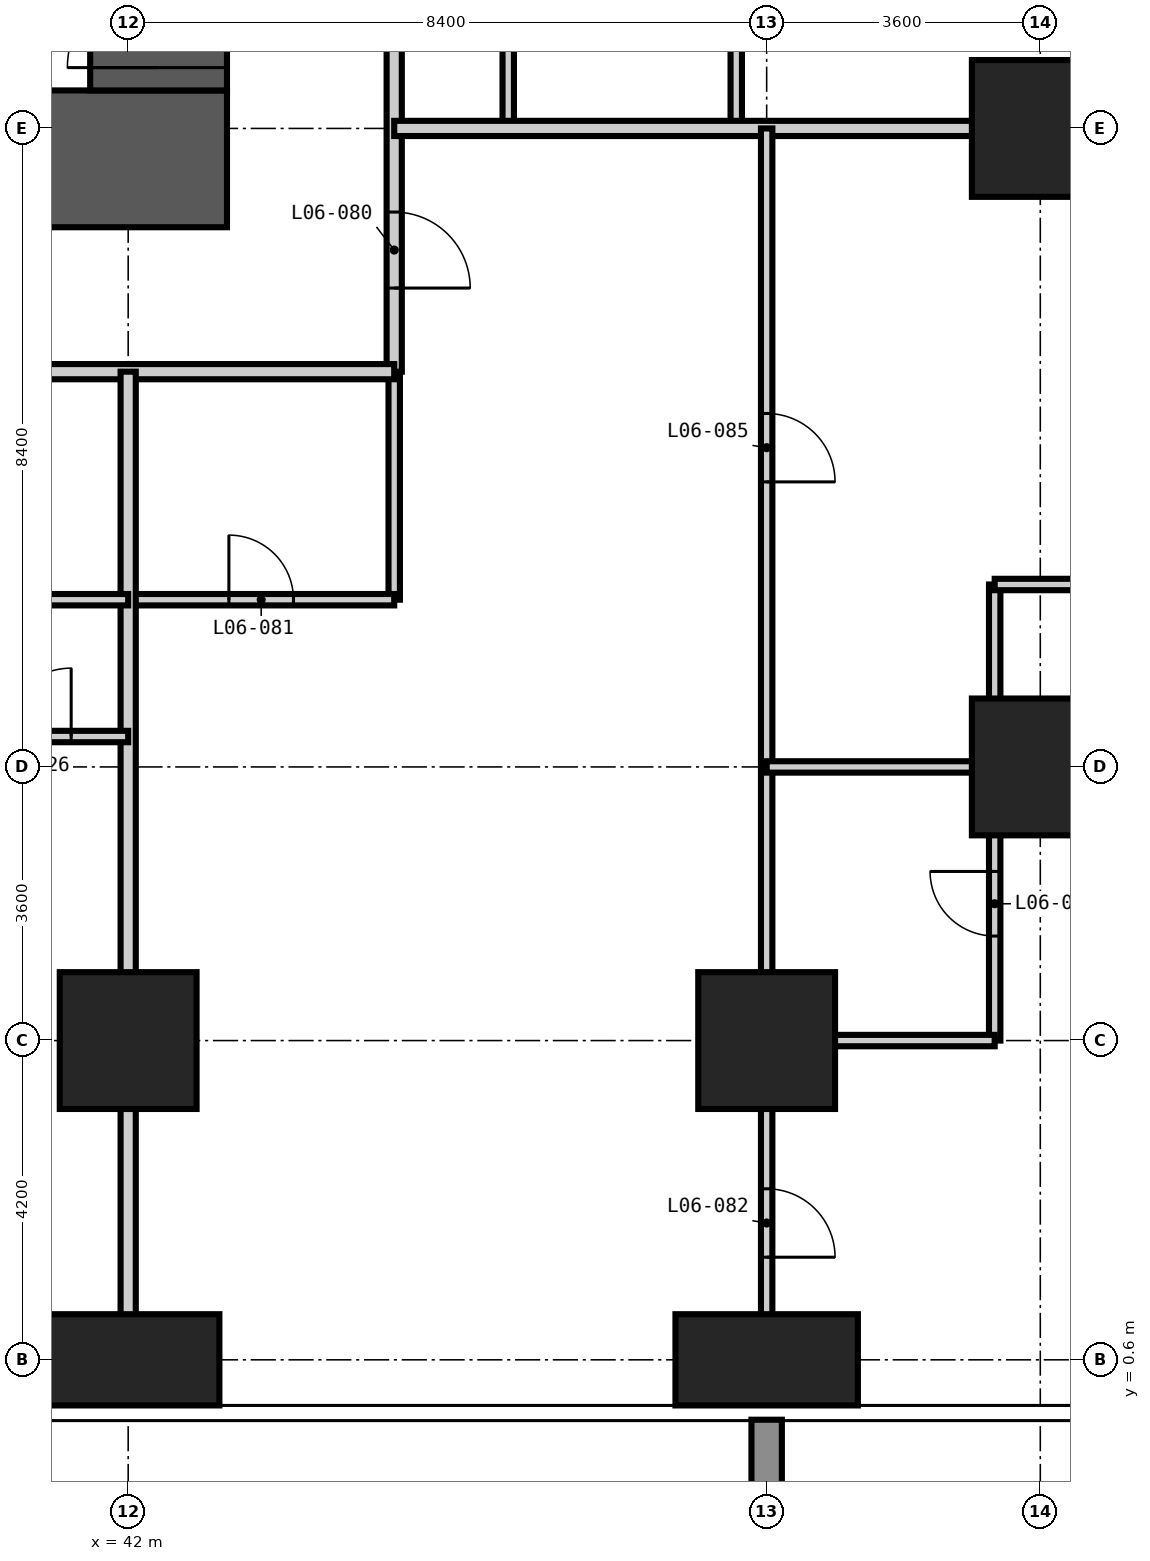
"""IFC4 building model, lengths in metres.
Left out: names, types, materials, properties, quantities, classifications, styles, units other than length and angle.
Written with IfcOpenShell. Run it as: python <this file> out.ifc"""

import sys

from ifc_helpers import new_model, si_unit, direction, frame, frame_2d, origin, origin_2d, place, context, subcontext, project, spatial, rectangle, extrude, element, fill, save


model = new_model("IFC4")
c1 = context("Model", 3, precision=1e-05, world=origin(), true_north=direction((0.0, 1.0)))
c2 = subcontext(c1, "Body", "Model", "MODEL_VIEW")
j1 = project(units=[si_unit("LENGTHUNIT", "METRE"), si_unit("PLANEANGLEUNIT", "RADIAN")], contexts=[c1])
p1 = place(None, origin())
s1 = spatial("IfcSite", under=j1, at=p1, CompositionType="ELEMENT")
p2 = place(p1, origin())
s2 = spatial("IfcBuilding", under=s1, at=p2, CompositionType="ELEMENT")
p3 = place(p2, frame((0.0, 0.0, 30.6)))
s3 = spatial("IfcBuildingStorey", under=s2, at=p3, CompositionType="ELEMENT", Elevation=30.6)
p4 = place(p3, frame((42.0, 0.6, -0.35), z_axis=(0.0, 0.0, 1.0), x_axis=(1.0, 0.0, 0.0)))
e1 = element("IfcColumn", 1, at=p4, inside=s3, PredefinedType="COLUMN", context=c2, shape_type="SweptSolid", body=[
    extrude(rectangle(XDim=2.4, YDim=1.2, at=origin_2d()), origin(), (0.0, 0.0, 1.0), 3.6),
])
p5 = place(p3, frame((42.0, 4.8, -0.35), z_axis=(0.0, 0.0, 1.0), x_axis=(1.0, 0.0, 0.0)))
e2 = element("IfcColumn", 2, at=p5, inside=s3, PredefinedType="COLUMN", context=c2, shape_type="SweptSolid", body=[
    extrude(rectangle(XDim=1.8, YDim=1.8, at=origin_2d()), origin(), (0.0, 0.0, 1.0), 3.6),
])
p6 = place(p3, frame((50.4, 0.6, -0.35), z_axis=(0.0, 0.0, 1.0), x_axis=(1.0, 0.0, 0.0)))
e3 = element("IfcColumn", 3, at=p6, inside=s3, PredefinedType="COLUMN", context=c2, shape_type="SweptSolid", body=[
    extrude(rectangle(XDim=2.4, YDim=1.2, at=origin_2d()), origin(), (0.0, 0.0, 1.0), 3.6),
])
for number, where, z_axis, x_axis in (
    (4, (50.4, 4.8, -0.35), (0.0, 0.0, 1.0), (1.0, 0.0, 0.0)),
    (5, (54.0, 8.4, -0.35), (0.0, 0.0, 1.0), (1.0, 0.0, 0.0)),
    (6, (54.0, 16.8, -0.35), (0.0, 0.0, 1.0), (1.0, 0.0, 0.0)),
):
    element("IfcColumn", number, at=place(p3, frame(where, z_axis=z_axis, x_axis=x_axis)), inside=s3, PredefinedType="COLUMN", context=c2, shape_type="SweptSolid", body=[
        extrude(rectangle(XDim=1.8, YDim=1.8, at=origin_2d()), origin(), (0.0, 0.0, 1.0), 3.6),
    ])
p7 = place(p3, frame((15.5, 16.4, -0.35), z_axis=(0.0, 0.0, 1.0), x_axis=(1.0, 0.0, 0.0)))
e7 = element("IfcWall", 7, at=p7, inside=s3, PredefinedType="SHEAR", context=c2, shape_type="SweptSolid", body=[
    extrude(rectangle(XDim=27.8, YDim=1.8, at=frame_2d((13.9, 0.0))), origin(), (0.0, 0.0, 1.0), 3.6),
])
p8 = place(p7, frame((13.4, 0.0, 0.35)))
e8 = element("IfcOpeningElement", 8, at=p8, cuts=e7, PredefinedType="OPENING", context=c2, shape_type="SweptSolid", body=[
    extrude(rectangle(XDim=1.0, YDim=2.1, at=frame_2d((0.5, 1.05))), frame((0.0, 0.91, 0.0), z_axis=(0.0, -1.0, 0.0), x_axis=(1.0, 0.0, 0.0)), (0.0, 0.0, 1.0), 1.82),
])
p9 = place(p7, frame((19.7, 0.0, 0.35)))
e9 = element("IfcOpeningElement", 9, at=p9, cuts=e7, PredefinedType="OPENING", context=c2, shape_type="SweptSolid", body=[
    extrude(rectangle(XDim=1.0, YDim=2.1, at=frame_2d((0.5, 1.05))), frame((0.0, 0.91, 0.0), z_axis=(0.0, -1.0, 0.0), x_axis=(1.0, 0.0, 0.0)), (0.0, 0.0, 1.0), 1.82),
])
p10 = place(p3, frame((42.4, 17.3, -0.35), z_axis=(0.0, 0.0, 1.0), x_axis=(0.0, 1.0, 0.0)))
e10 = element("IfcWall", 10, at=p10, inside=s3, PredefinedType="SHEAR", context=c2, shape_type="SweptSolid", body=[
    extrude(rectangle(XDim=24.2, YDim=1.8, at=frame_2d((12.1, 0.0))), origin(), (0.0, 0.0, 1.0), 3.6),
])
p11 = place(p10, frame((0.3, 0.0, 0.35)))
e11 = element("IfcOpeningElement", 11, at=p11, cuts=e10, PredefinedType="OPENING", context=c2, shape_type="SweptSolid", body=[
    extrude(rectangle(XDim=1.2, YDim=2.2, at=frame_2d((0.6, 1.1))), frame((0.0, 0.91, 0.0), z_axis=(0.0, -1.0, 0.0), x_axis=(1.0, 0.0, 0.0)), (0.0, 0.0, 1.0), 1.82),
])
p12 = place(p10, frame((11.6, 0.0, 0.35)))
e12 = element("IfcOpeningElement", 12, at=p12, cuts=e10, PredefinedType="OPENING", context=c2, shape_type="SweptSolid", body=[
    extrude(rectangle(XDim=1.0, YDim=2.1, at=frame_2d((0.5, 1.05))), frame((0.0, 0.91, 0.0), z_axis=(0.0, -1.0, 0.0), x_axis=(1.0, 0.0, 0.0)), (0.0, 0.0, 1.0), 1.82),
])
p13 = place(p10, frame((20.0, 0.0, 0.35)))
e13 = element("IfcOpeningElement", 13, at=p13, cuts=e10, PredefinedType="OPENING", context=c2, shape_type="SweptSolid", body=[
    extrude(rectangle(XDim=1.0, YDim=2.1, at=frame_2d((0.5, 1.05))), frame((0.0, 0.91, 0.0), z_axis=(0.0, -1.0, 0.0), x_axis=(1.0, 0.0, 0.0)), (0.0, 0.0, 1.0), 1.82),
])
p14 = place(p3, frame((45.5, 10.6, 0.0), z_axis=(0.0, 0.0, 1.0), x_axis=(0.0, 1.0, 0.0)))
e14 = element("IfcWall", 14, at=p14, inside=s3, PredefinedType="PARTITIONING", context=c2, shape_type="SweptSolid", body=[
    extrude(rectangle(XDim=3.0, YDim=0.15, at=frame_2d((1.5, 0.0))), origin(), (0.0, 0.0, 1.0), 3.25),
])
for number, where, z_axis, x_axis in (
    (15, (47.0, 16.8, 0.0), (0.0, 0.0, 1.0), (0.0, 1.0, 0.0)),
    (16, (50.0, 16.8, 0.0), (0.0, 0.0, 1.0), (0.0, 1.0, 0.0)),
):
    element("IfcWall", number, at=place(p3, frame(where, z_axis=z_axis, x_axis=x_axis)), inside=s3, PredefinedType="PARTITIONING", context=c2, shape_type="SweptSolid", body=[
        extrude(rectangle(XDim=2.7, YDim=0.15, at=frame_2d((1.35, 0.0))), origin(), (0.0, 0.0, 1.0), 3.25),
    ])
p15 = place(p3, frame((53.4, 4.8, 0.0), z_axis=(0.0, 0.0, 1.0), x_axis=(0.0, 1.0, 0.0)))
e17 = element("IfcWall", 17, at=p15, inside=s3, PredefinedType="PARTITIONING", context=c2, shape_type="SweptSolid", body=[
    extrude(rectangle(XDim=3.6, YDim=0.15, at=frame_2d((1.8, 0.0))), origin(), (0.0, 0.0, 1.0), 3.25),
])
p16 = place(p15, frame((1.375, 0.0, 0.0)))
e18 = element("IfcOpeningElement", 18, at=p16, cuts=e17, PredefinedType="OPENING", context=c2, shape_type="SweptSolid", body=[
    extrude(rectangle(XDim=0.85, YDim=2.1, at=frame_2d((0.425, 1.05))), frame((0.0, 0.085, 0.0), z_axis=(0.0, -1.0, 0.0), x_axis=(1.0, 0.0, 0.0)), (0.0, 0.0, 1.0), 0.17),
])
p17 = place(p3, frame((50.4, 4.8, 0.0), z_axis=(0.0, 0.0, 1.0), x_axis=(1.0, 0.0, 0.0)))
e19 = element("IfcWall", 19, at=p17, inside=s3, PredefinedType="PARTITIONING", context=c2, shape_type="SweptSolid", body=[
    extrude(rectangle(XDim=3.0, YDim=0.15, at=frame_2d((1.5, 0.0))), origin(), (0.0, 0.0, 1.0), 3.25),
])
p18 = place(p3, frame((42.0, 10.6, 0.0), z_axis=(0.0, 0.0, 1.0), x_axis=(1.0, 0.0, 0.0)))
e20 = element("IfcWall", 20, at=p18, inside=s3, PredefinedType="PARTITIONING", context=c2, shape_type="SweptSolid", body=[
    extrude(rectangle(XDim=3.5, YDim=0.15, at=frame_2d((1.75, 0.0))), origin(), (0.0, 0.0, 1.0), 3.25),
])
p19 = place(p18, frame((1.325, 0.0, 0.0)))
e21 = element("IfcOpeningElement", 21, at=p19, cuts=e20, PredefinedType="OPENING", context=c2, shape_type="SweptSolid", body=[
    extrude(rectangle(XDim=0.85, YDim=2.1, at=frame_2d((0.425, 1.05))), frame((0.0, 0.085, 0.0), z_axis=(0.0, -1.0, 0.0), x_axis=(1.0, 0.0, 0.0)), (0.0, 0.0, 1.0), 0.17),
])
p20 = place(p3, frame((45.5, 45.8, 0.0), z_axis=(0.0, 0.0, 1.0), x_axis=(0.0, -1.0, 0.0)))
e22 = element("IfcWall", 22, at=p20, inside=s3, PredefinedType="PARTITIONING", context=c2, shape_type="SweptSolid", body=[
    extrude(rectangle(XDim=32.2, YDim=0.2, at=frame_2d((16.1, 0.0))), origin(), (0.0, 0.0, 1.0), 3.25),
])
p21 = place(p20, frame((26.4, 0.0, 0.0)))
e23 = element("IfcOpeningElement", 23, at=p21, cuts=e22, PredefinedType="OPENING", context=c2, shape_type="SweptSolid", body=[
    extrude(rectangle(XDim=1.0, YDim=2.2, at=frame_2d((0.5, 1.1))), frame((0.0, 0.11, 0.0), z_axis=(0.0, -1.0, 0.0), x_axis=(1.0, 0.0, 0.0)), (0.0, 0.0, 1.0), 0.22),
])
p22 = place(p20, frame((22.2, 0.0, 0.0)))
e24 = element("IfcOpeningElement", 24, at=p22, cuts=e22, PredefinedType="OPENING", context=c2, shape_type="SweptSolid", body=[
    extrude(rectangle(XDim=1.0, YDim=2.2, at=frame_2d((0.5, 1.1))), frame((0.0, 0.11, 0.0), z_axis=(0.0, -1.0, 0.0), x_axis=(1.0, 0.0, 0.0)), (0.0, 0.0, 1.0), 0.22),
])
p23 = place(p20, frame((16.8, 0.0, 0.0)))
e25 = element("IfcOpeningElement", 25, at=p23, cuts=e22, PredefinedType="OPENING", context=c2, shape_type="SweptSolid", body=[
    extrude(rectangle(XDim=1.0, YDim=2.2, at=frame_2d((0.5, 1.1))), frame((0.0, 0.11, 0.0), z_axis=(0.0, -1.0, 0.0), x_axis=(1.0, 0.0, 0.0)), (0.0, 0.0, 1.0), 0.22),
])
p24 = place(p20, frame((15.0, 0.0, 0.0)))
e26 = element("IfcOpeningElement", 26, at=p24, cuts=e22, PredefinedType="OPENING", context=c2, shape_type="SweptSolid", body=[
    extrude(rectangle(XDim=1.0, YDim=2.2, at=frame_2d((0.5, 1.1))), frame((0.0, 0.11, 0.0), z_axis=(0.0, -1.0, 0.0), x_axis=(1.0, 0.0, 0.0)), (0.0, 0.0, 1.0), 0.22),
])
p25 = place(p20, frame((8.4, 0.0, 0.0)))
e27 = element("IfcOpeningElement", 27, at=p25, cuts=e22, PredefinedType="OPENING", context=c2, shape_type="SweptSolid", body=[
    extrude(rectangle(XDim=1.0, YDim=2.2, at=frame_2d((0.5, 1.1))), frame((0.0, 0.11, 0.0), z_axis=(0.0, -1.0, 0.0), x_axis=(1.0, 0.0, 0.0)), (0.0, 0.0, 1.0), 0.22),
])
p26 = place(p20, frame((6.6, 0.0, 0.0)))
e28 = element("IfcOpeningElement", 28, at=p26, cuts=e22, PredefinedType="OPENING", context=c2, shape_type="SweptSolid", body=[
    extrude(rectangle(XDim=1.0, YDim=2.2, at=frame_2d((0.5, 1.1))), frame((0.0, 0.11, 0.0), z_axis=(0.0, -1.0, 0.0), x_axis=(1.0, 0.0, 0.0)), (0.0, 0.0, 1.0), 0.22),
])
p27 = place(p20, frame((30.1, 0.0, 0.0)))
e29 = element("IfcOpeningElement", 29, at=p27, cuts=e22, PredefinedType="OPENING", context=c2, shape_type="SweptSolid", body=[
    extrude(rectangle(XDim=1.0, YDim=2.2, at=frame_2d((0.5, 1.1))), frame((0.0, 0.11, 0.0), z_axis=(0.0, -1.0, 0.0), x_axis=(1.0, 0.0, 0.0)), (0.0, 0.0, 1.0), 0.22),
])
p28 = place(p20, frame((1.4, 0.0, 0.0)))
e30 = element("IfcOpeningElement", 30, at=p28, cuts=e22, PredefinedType="OPENING", context=c2, shape_type="SweptSolid", body=[
    extrude(rectangle(XDim=1.0, YDim=2.2, at=frame_2d((0.5, 1.1))), frame((0.0, 0.11, 0.0), z_axis=(0.0, -1.0, 0.0), x_axis=(1.0, 0.0, 0.0)), (0.0, 0.0, 1.0), 0.22),
])
p29 = place(p3, frame((45.5, 13.6, 0.0), z_axis=(0.0, 0.0, 1.0), x_axis=(-1.0, 0.0, 0.0)))
e31 = element("IfcWall", 31, at=p29, inside=s3, PredefinedType="PARTITIONING", context=c2, shape_type="SweptSolid", body=[
    extrude(rectangle(XDim=31.9, YDim=0.2, at=frame_2d((15.95, 0.0))), origin(), (0.0, 0.0, 1.0), 3.25),
])
p30 = place(p29, frame((24.9, 0.0, 0.0)))
e32 = element("IfcOpeningElement", 32, at=p30, cuts=e31, PredefinedType="OPENING", context=c2, shape_type="SweptSolid", body=[
    extrude(rectangle(XDim=1.0, YDim=2.2, at=frame_2d((0.5, 1.1))), frame((0.0, 0.11, 0.0), z_axis=(0.0, -1.0, 0.0), x_axis=(1.0, 0.0, 0.0)), (0.0, 0.0, 1.0), 0.22),
])
p31 = place(p29, frame((23.1, 0.0, 0.0)))
e33 = element("IfcOpeningElement", 33, at=p31, cuts=e31, PredefinedType="OPENING", context=c2, shape_type="SweptSolid", body=[
    extrude(rectangle(XDim=1.0, YDim=2.2, at=frame_2d((0.5, 1.1))), frame((0.0, 0.11, 0.0), z_axis=(0.0, -1.0, 0.0), x_axis=(1.0, 0.0, 0.0)), (0.0, 0.0, 1.0), 0.22),
])
p32 = place(p29, frame((16.5, 0.0, 0.0)))
e34 = element("IfcOpeningElement", 34, at=p32, cuts=e31, PredefinedType="OPENING", context=c2, shape_type="SweptSolid", body=[
    extrude(rectangle(XDim=1.0, YDim=2.2, at=frame_2d((0.5, 1.1))), frame((0.0, 0.11, 0.0), z_axis=(0.0, -1.0, 0.0), x_axis=(1.0, 0.0, 0.0)), (0.0, 0.0, 1.0), 0.22),
])
p33 = place(p29, frame((14.7, 0.0, 0.0)))
e35 = element("IfcOpeningElement", 35, at=p33, cuts=e31, PredefinedType="OPENING", context=c2, shape_type="SweptSolid", body=[
    extrude(rectangle(XDim=1.0, YDim=2.2, at=frame_2d((0.5, 1.1))), frame((0.0, 0.11, 0.0), z_axis=(0.0, -1.0, 0.0), x_axis=(1.0, 0.0, 0.0)), (0.0, 0.0, 1.0), 0.22),
])
p34 = place(p29, frame((8.1, 0.0, 0.0)))
e36 = element("IfcOpeningElement", 36, at=p34, cuts=e31, PredefinedType="OPENING", context=c2, shape_type="SweptSolid", body=[
    extrude(rectangle(XDim=1.0, YDim=2.2, at=frame_2d((0.5, 1.1))), frame((0.0, 0.11, 0.0), z_axis=(0.0, -1.0, 0.0), x_axis=(1.0, 0.0, 0.0)), (0.0, 0.0, 1.0), 0.22),
])
p35 = place(p29, frame((6.3, 0.0, 0.0)))
e37 = element("IfcOpeningElement", 37, at=p35, cuts=e31, PredefinedType="OPENING", context=c2, shape_type="SweptSolid", body=[
    extrude(rectangle(XDim=1.0, YDim=2.2, at=frame_2d((0.5, 1.1))), frame((0.0, 0.11, 0.0), z_axis=(0.0, -1.0, 0.0), x_axis=(1.0, 0.0, 0.0)), (0.0, 0.0, 1.0), 0.22),
])
p36 = place(p3, frame((42.0, -0.008, 0.0), z_axis=(0.0, 0.0, 1.0), x_axis=(0.0, 1.0, 0.0)))
e38 = element("IfcWall", 38, at=p36, inside=s3, PredefinedType="PARTITIONING", context=c2, shape_type="SweptSolid", body=[
    extrude(rectangle(XDim=13.608, YDim=0.2, at=frame_2d((6.804, 0.0))), origin(), (0.0, 0.0, 1.0), 3.25),
])
p37 = place(p3, frame((45.5, 16.8, 0.0), z_axis=(0.0, 0.0, 1.0), x_axis=(1.0, 0.0, 0.0)))
e39 = element("IfcWall", 39, at=p37, inside=s3, PredefinedType="PARTITIONING", context=c2, shape_type="SweptSolid", body=[
    extrude(rectangle(XDim=13.308, YDim=0.2, at=frame_2d((6.654, 0.0))), origin(), (0.0, 0.0, 1.0), 3.25),
])
p38 = place(p3, frame((50.4, -0.008, 0.0), z_axis=(0.0, 0.0, 1.0), x_axis=(0.0, 1.0, 0.0)))
e40 = element("IfcWall", 40, at=p38, inside=s3, PredefinedType="PARTITIONING", context=c2, shape_type="SweptSolid", body=[
    extrude(rectangle(XDim=16.808, YDim=0.15, at=frame_2d((8.404, 0.0))), origin(), (0.0, 0.0, 1.0), 3.25),
])
p39 = place(p38, frame((1.958, 0.0, 0.0)))
e41 = element("IfcOpeningElement", 41, at=p39, cuts=e40, PredefinedType="OPENING", context=c2, shape_type="SweptSolid", body=[
    extrude(rectangle(XDim=0.9, YDim=2.1, at=frame_2d((0.45, 1.05))), frame((0.0, 0.085, 0.0), z_axis=(0.0, -1.0, 0.0), x_axis=(1.0, 0.0, 0.0)), (0.0, 0.0, 1.0), 0.17),
])
p40 = place(p38, frame((12.158, 0.0, 0.0)))
e42 = element("IfcOpeningElement", 42, at=p40, cuts=e40, PredefinedType="OPENING", context=c2, shape_type="SweptSolid", body=[
    extrude(rectangle(XDim=0.9, YDim=2.1, at=frame_2d((0.45, 1.05))), frame((0.0, 0.085, 0.0), z_axis=(0.0, -1.0, 0.0), x_axis=(1.0, 0.0, 0.0)), (0.0, 0.0, 1.0), 0.17),
])
p41 = place(p3, frame((53.4, 8.4, 0.0), z_axis=(0.0, 0.0, 1.0), x_axis=(0.0, 1.0, 0.0)))
e43 = element("IfcWall", 43, at=p41, inside=s3, PredefinedType="PARTITIONING", context=c2, shape_type="SweptSolid", body=[
    extrude(rectangle(XDim=2.4, YDim=0.15, at=frame_2d((1.2, 0.0))), origin(), (0.0, 0.0, 1.0), 3.25),
])
p42 = place(p3, frame((50.4, 8.4, 0.0), z_axis=(0.0, 0.0, 1.0), x_axis=(1.0, 0.0, 0.0)))
e44 = element("IfcWall", 44, at=p42, inside=s3, PredefinedType="PARTITIONING", context=c2, shape_type="SweptSolid", body=[
    extrude(rectangle(XDim=8.408, YDim=0.15, at=frame_2d((4.204, 0.0))), origin(), (0.0, 0.0, 1.0), 3.25),
])
p43 = place(p42, frame((4.55, 0.0, 0.0)))
e45 = element("IfcOpeningElement", 45, at=p43, cuts=e44, PredefinedType="OPENING", context=c2, shape_type="SweptSolid", body=[
    extrude(rectangle(XDim=0.9, YDim=2.1, at=frame_2d((0.45, 1.05))), frame((0.0, 0.085, 0.0), z_axis=(0.0, -1.0, 0.0), x_axis=(1.0, 0.0, 0.0)), (0.0, 0.0, 1.0), 0.17),
])
p44 = place(p3, frame((39.6, 8.8, 0.0), z_axis=(0.0, 0.0, 1.0), x_axis=(1.0, 0.0, 0.0)))
e46 = element("IfcWall", 46, at=p44, inside=s3, PredefinedType="PARTITIONING", context=c2, shape_type="SweptSolid", body=[
    extrude(rectangle(XDim=2.4, YDim=0.15, at=frame_2d((1.2, 0.0))), origin(), (0.0, 0.0, 1.0), 3.25),
])
p45 = place(p44, frame((0.75, 0.0, 0.0)))
e47 = element("IfcOpeningElement", 47, at=p45, cuts=e46, PredefinedType="OPENING", context=c2, shape_type="SweptSolid", body=[
    extrude(rectangle(XDim=0.9, YDim=2.1, at=frame_2d((0.45, 1.05))), frame((0.0, 0.085, 0.0), z_axis=(0.0, -1.0, 0.0), x_axis=(1.0, 0.0, 0.0)), (0.0, 0.0, 1.0), 0.17),
])
p46 = place(p3, frame((39.6, 10.6, 0.0), z_axis=(0.0, 0.0, 1.0), x_axis=(1.0, 0.0, 0.0)))
e48 = element("IfcWall", 48, at=p46, inside=s3, PredefinedType="PARTITIONING", context=c2, shape_type="SweptSolid", body=[
    extrude(rectangle(XDim=2.4, YDim=0.15, at=frame_2d((1.2, 0.0))), origin(), (0.0, 0.0, 1.0), 3.25),
])
p47 = place(p3, frame((53.4, 10.8, 0.0), z_axis=(0.0, 0.0, 1.0), x_axis=(1.0, 0.0, 0.0)))
e49 = element("IfcWall", 49, at=p47, inside=s3, PredefinedType="PARTITIONING", context=c2, shape_type="SweptSolid", body=[
    extrude(rectangle(XDim=3.0, YDim=0.15, at=frame_2d((1.5, 0.0))), origin(), (0.0, 0.0, 1.0), 3.25),
])
p48 = place(p11, origin())
e50 = element("IfcDoor", 50, at=p48, inside=s3, OperationType="SINGLE_SWING_LEFT", PredefinedType="DOOR", context=c2, shape_type="SweptSolid", body=[
    extrude(rectangle(XDim=1.2, YDim=2.2, at=frame_2d((0.6, 1.1))), frame((0.0, 0.025, 0.0), z_axis=(0.0, -1.0, 0.0), x_axis=(1.0, 0.0, 0.0)), (0.0, 0.0, 1.0), 0.05),
])
fill(e11, e50)
p49 = place(p45, origin())
e51 = element("IfcDoor", 51, at=p49, inside=s3, OperationType="SINGLE_SWING_RIGHT", PredefinedType="DOOR", context=c2, shape_type="SweptSolid", body=[
    extrude(rectangle(XDim=0.9, YDim=2.1, at=frame_2d((0.45, 1.05))), frame((0.0, 0.025, 0.0), z_axis=(0.0, -1.0, 0.0), x_axis=(1.0, 0.0, 0.0)), (0.0, 0.0, 1.0), 0.05),
])
fill(e47, e51)
p50 = place(p27, origin())
e52 = element("IfcDoor", 52, at=p50, inside=s3, OperationType="SINGLE_SWING_RIGHT", PredefinedType="DOOR", context=c2, shape_type="SweptSolid", body=[
    extrude(rectangle(XDim=1.0, YDim=2.2, at=frame_2d((0.5, 1.1))), frame((0.0, 0.025, 0.0), z_axis=(0.0, -1.0, 0.0), x_axis=(1.0, 0.0, 0.0)), (0.0, 0.0, 1.0), 0.05),
])
fill(e29, e52)
p51 = place(p19, origin())
e53 = element("IfcDoor", 53, at=p51, inside=s3, OperationType="SINGLE_SWING_LEFT", PredefinedType="DOOR", context=c2, shape_type="SweptSolid", body=[
    extrude(rectangle(XDim=0.85, YDim=2.1, at=frame_2d((0.425, 1.05))), frame((0.0, 0.025, 0.0), z_axis=(0.0, -1.0, 0.0), x_axis=(1.0, 0.0, 0.0)), (0.0, 0.0, 1.0), 0.05),
])
fill(e21, e53)
p52 = place(p39, frame((0.9, 0.0, 0.0), z_axis=(0.0, 0.0, 1.0), x_axis=(-1.0, 0.0, 0.0)))
e54 = element("IfcDoor", 54, at=p52, inside=s3, OperationType="SINGLE_SWING_RIGHT", PredefinedType="DOOR", context=c2, shape_type="SweptSolid", body=[
    extrude(rectangle(XDim=0.9, YDim=2.1, at=frame_2d((0.45, 1.05))), frame((0.0, 0.025, 0.0), z_axis=(0.0, -1.0, 0.0), x_axis=(1.0, 0.0, 0.0)), (0.0, 0.0, 1.0), 0.05),
])
fill(e41, e54)
p53 = place(p16, origin())
e55 = element("IfcDoor", 55, at=p53, inside=s3, OperationType="SINGLE_SWING_RIGHT", PredefinedType="DOOR", context=c2, shape_type="SweptSolid", body=[
    extrude(rectangle(XDim=0.85, YDim=2.1, at=frame_2d((0.425, 1.05))), frame((0.0, 0.025, 0.0), z_axis=(0.0, -1.0, 0.0), x_axis=(1.0, 0.0, 0.0)), (0.0, 0.0, 1.0), 0.05),
])
fill(e18, e55)
p54 = place(p40, frame((0.9, 0.0, 0.0), z_axis=(0.0, 0.0, 1.0), x_axis=(-1.0, 0.0, 0.0)))
e56 = element("IfcDoor", 56, at=p54, inside=s3, OperationType="SINGLE_SWING_RIGHT", PredefinedType="DOOR", context=c2, shape_type="SweptSolid", body=[
    extrude(rectangle(XDim=0.9, YDim=2.1, at=frame_2d((0.45, 1.05))), frame((0.0, 0.025, 0.0), z_axis=(0.0, -1.0, 0.0), x_axis=(1.0, 0.0, 0.0)), (0.0, 0.0, 1.0), 0.05),
])
fill(e42, e56)
save(model, sys.argv[1])
